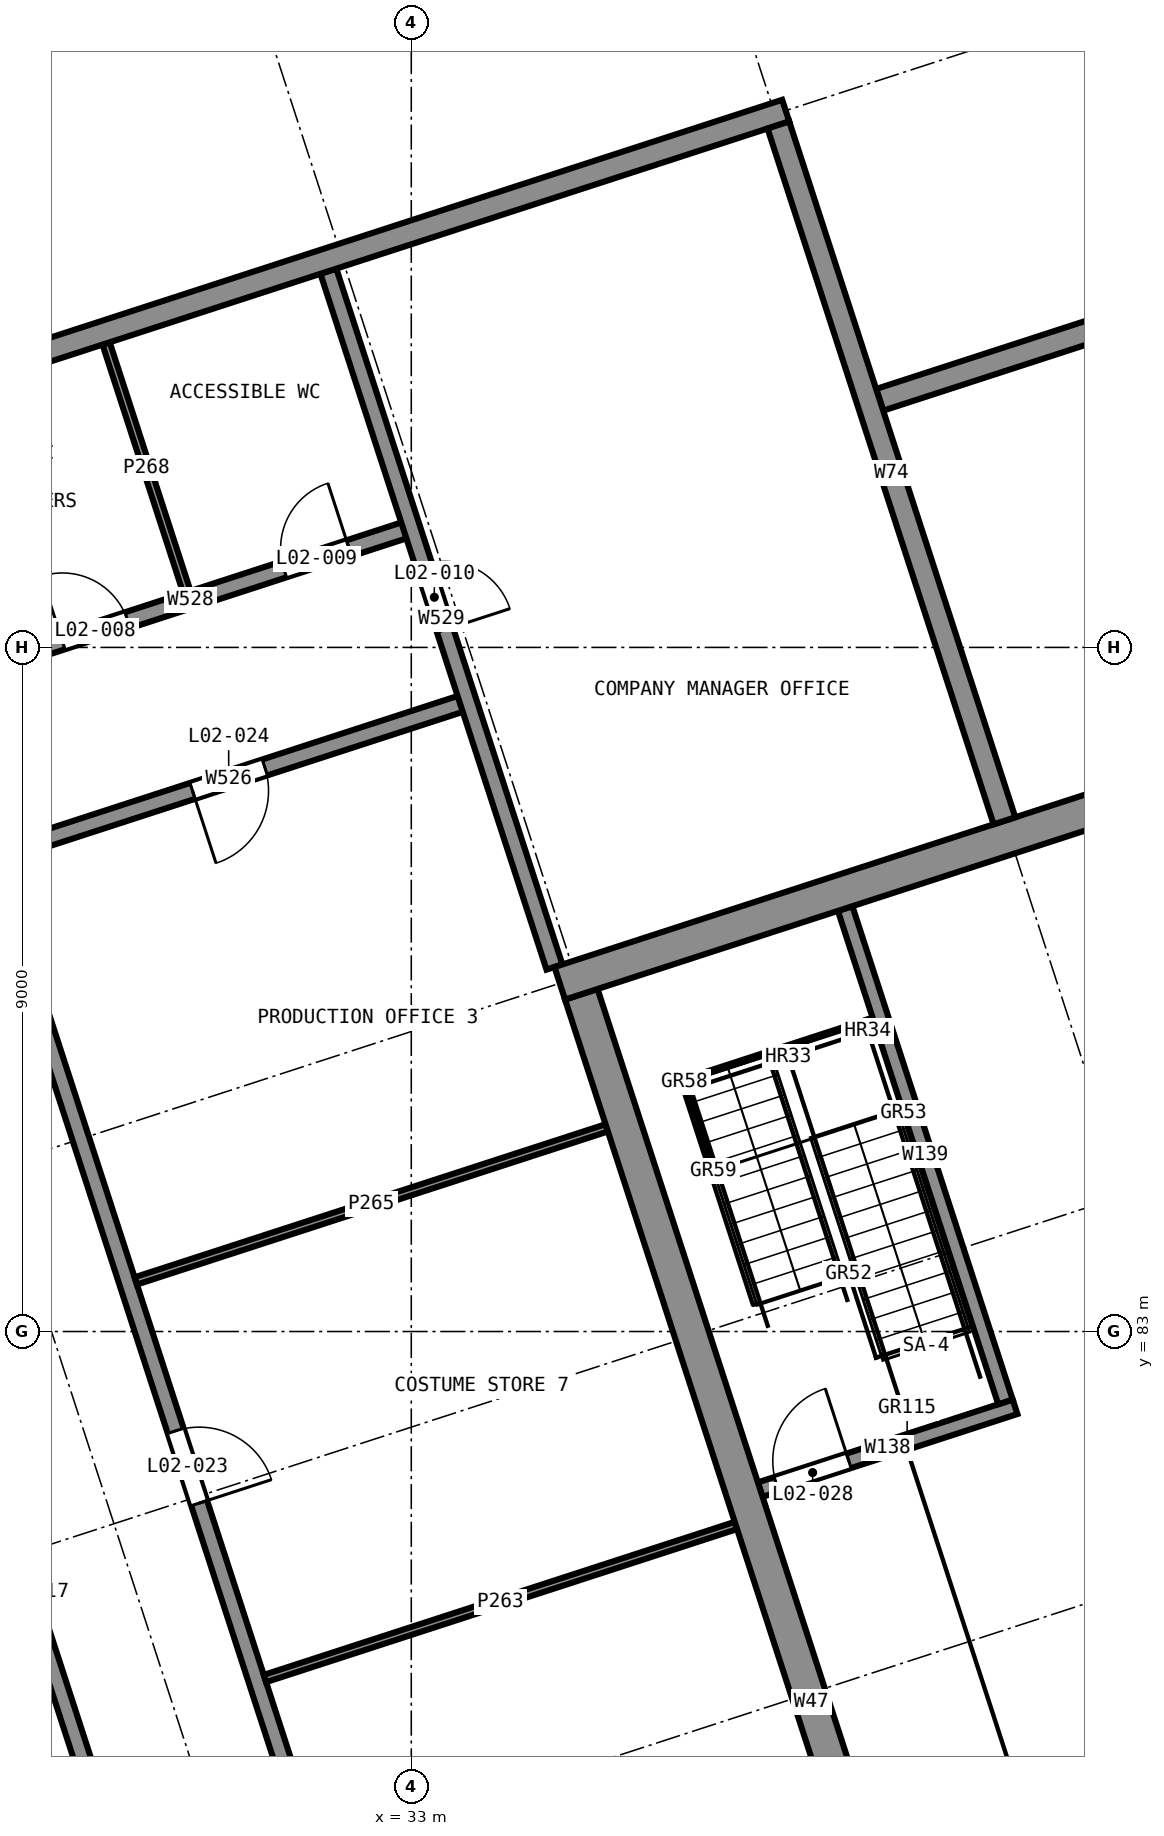
"""IFC4 building model, lengths in metres.
Left out: names, types, materials, properties, quantities, classifications, styles, units other than length and angle.
Written with IfcOpenShell. Run it as: python <this file> out.ifc"""

import sys

from ifc_helpers import new_model, si_unit, direction, frame, frame_2d, origin, place, context, subcontext, project, spatial, rectangle, extrude, element, fill, save


model = new_model("IFC4")
c1 = context("Model", 3, precision=1e-05, world=origin(), true_north=direction((0.0, 1.0)))
c2 = subcontext(c1, "Body", "Model", "MODEL_VIEW")
j1 = project(units=[si_unit("LENGTHUNIT", "METRE"), si_unit("PLANEANGLEUNIT", "RADIAN")], contexts=[c1])
p1 = place(None, origin())
s1 = spatial("IfcSite", under=j1, at=p1, CompositionType="ELEMENT")
p2 = place(p1, origin())
s2 = spatial("IfcBuilding", under=s1, at=p2, CompositionType="ELEMENT")
p3 = place(p2, frame((0.0, 0.0, 9.5)))
s3 = spatial("IfcBuildingStorey", under=s2, at=p3, CompositionType="ELEMENT", Elevation=9.5)
p4 = place(p3, frame((41.286, 68.82, 0.0), z_axis=(0.0, 0.0, 1.0), x_axis=(-0.309008517326, 0.951059270613, 0.0)))
e1 = element("IfcWall", 1, at=p4, inside=s3, PredefinedType="SHEAR", context=c2, shape_type="SweptSolid", body=[
    extrude(rectangle(XDim=19.575, YDim=0.45, at=frame_2d((9.788, 0.0))), origin(), (0.0, 0.0, 1.0), 4.0),
])
p5 = place(p3, frame((34.953, 87.581, 0.0), z_axis=(0.0, 0.0, 1.0), x_axis=(0.951059165148, 0.309008841924, 0.0)))
e2 = element("IfcWall", 2, at=p5, inside=s3, PredefinedType="SHEAR", context=c2, shape_type="SweptSolid", body=[
    extrude(rectangle(XDim=29.45, YDim=0.45, at=frame_2d((14.725, 0.0))), origin(), (0.0, 0.0, 1.0), 4.0),
])
p6 = place(p3, frame((41.562, 68.699, 2.0), z_axis=(0.0, 0.0, 1.0), x_axis=(0.951058008754, 0.309012401021, 0.0)))
e3 = element("IfcWall", 3, at=p6, inside=s3, PredefinedType="SHEAR", context=c2, shape_type="SweptSolid", body=[
    extrude(rectangle(XDim=28.55, YDim=0.4, at=frame_2d((14.275, 0.0))), origin(), (0.0, 0.0, 1.0), 2.0),
])
p7 = place(p3, frame((33.501, 41.003, 0.0), z_axis=(0.0, 0.0, 1.0), x_axis=(-0.309017194826, 0.951056451165, 0.0)))
e4 = element("IfcWall", 4, at=p7, inside=s3, PredefinedType="SOLIDWALL", context=c2, shape_type="SweptSolid", body=[
    extrude(rectangle(XDim=53.7, YDim=0.3, at=frame_2d((26.85, 0.0))), origin(), (0.0, 0.0, 1.0), 4.0),
])
p8 = place(p7, frame((21.55, 0.0, 0.9)))
e5 = element("IfcOpeningElement", 5, at=p8, cuts=e4, PredefinedType="OPENING", context=c2, shape_type="SweptSolid", body=[
    extrude(rectangle(XDim=3.6, YDim=2.1, at=frame_2d((1.8, 1.05))), frame((0.0, 0.16, 0.0), z_axis=(0.0, -1.0, 0.0), x_axis=(1.0, 0.0, 0.0)), (0.0, 0.0, 1.0), 0.32),
])
p9 = place(p3, frame((16.718, 92.171, 0.0), z_axis=(0.0, 0.0, 1.0), x_axis=(0.951055789165, 0.309019232243, 0.0)))
e6 = element("IfcWall", 6, at=p9, inside=s3, PredefinedType="SOLIDWALL", context=c2, shape_type="SweptSolid", body=[
    extrude(rectangle(XDim=22.3, YDim=0.3, at=frame_2d((11.15, 0.0))), origin(), (0.0, 0.0, 1.0), 4.0),
])
p10 = place(p3, frame((37.83, 98.873, 0.0), z_axis=(0.0, 0.0, 1.0), x_axis=(0.30902011435, -0.951055502548, 0.0)))
e7 = element("IfcWall", 7, at=p10, inside=s3, PredefinedType="SOLIDWALL", context=c2, shape_type="SweptSolid", body=[
    extrude(rectangle(XDim=9.625, YDim=0.3, at=frame_2d((4.812, 0.0))), origin(), (0.0, 0.0, 1.0), 4.0),
])
p11 = place(p3, frame((39.162, 95.258, 0.0), z_axis=(0.0, 0.0, 1.0), x_axis=(0.951058550479, 0.309010733732, 0.0)))
e8 = element("IfcWall", 8, at=p11, inside=s3, PredefinedType="SOLIDWALL", context=c2, shape_type="SweptSolid", body=[
    extrude(rectangle(XDim=17.0, YDim=0.3, at=frame_2d((8.5, 0.0))), origin(), (0.0, 0.0, 1.0), 4.0),
])
p12 = place(p3, frame((37.591, 80.92, 0.0), z_axis=(0.0, 0.0, 1.0), x_axis=(0.951052389726, 0.30902969436, 0.0)))
e9 = element("IfcWall", 9, at=p12, inside=s3, PredefinedType="SOLIDWALL", context=c2, shape_type="SweptSolid", body=[
    extrude(rectangle(XDim=3.525, YDim=0.2, at=frame_2d((1.763, 0.0))), origin(), (0.0, 0.0, 1.0), 4.0),
])
p13 = place(p12, frame((0.225, 0.0, 0.0)))
e10 = element("IfcOpeningElement", 10, at=p13, cuts=e9, PredefinedType="OPENING", context=c2, shape_type="SweptSolid", body=[
    extrude(rectangle(XDim=1.0, YDim=2.1, at=frame_2d((0.5, 1.05))), frame((0.0, 0.11, 0.0), z_axis=(0.0, -1.0, 0.0), x_axis=(1.0, 0.0, 0.0)), (0.0, 0.0, 1.0), 0.22),
])
p14 = place(p3, frame((40.817, 82.074, 0.0), z_axis=(0.0, 0.0, 1.0), x_axis=(-0.309028643499, 0.951052731186, 0.0)))
e11 = element("IfcWall", 11, at=p14, inside=s3, PredefinedType="SOLIDWALL", context=c2, shape_type="SweptSolid", body=[
    extrude(rectangle(XDim=6.825, YDim=0.2, at=frame_2d((3.413, 0.0))), origin(), (0.0, 0.0, 1.0), 4.0),
])
p15 = place(p3, frame((37.956, 48.812, 0.0), z_axis=(0.0, 0.0, 1.0), x_axis=(-0.30901736393, 0.951056396219, 0.0)))
e12 = element("IfcWall", 12, at=p15, inside=s3, PredefinedType="SOLIDWALL", context=c2, shape_type="SweptSolid", body=[
    extrude(rectangle(XDim=41.7, YDim=0.22, at=frame_2d((20.85, 0.0))), origin(), (0.0, 0.0, 1.0), 3.7),
])
p16 = place(p15, frame((2.009, 0.0, 0.0)))
e13 = element("IfcOpeningElement", 13, at=p16, cuts=e12, PredefinedType="OPENING", context=c2, shape_type="SweptSolid", body=[
    extrude(rectangle(XDim=1.0, YDim=2.1, at=frame_2d((0.5, 1.05))), frame((0.0, 0.12, 0.0), z_axis=(0.0, -1.0, 0.0), x_axis=(1.0, 0.0, 0.0)), (0.0, 0.0, 1.0), 0.24),
])
p17 = place(p15, frame((6.6, 0.0, 0.0)))
e14 = element("IfcOpeningElement", 14, at=p17, cuts=e12, PredefinedType="OPENING", context=c2, shape_type="SweptSolid", body=[
    extrude(rectangle(XDim=1.2, YDim=2.1, at=frame_2d((0.6, 1.05))), frame((0.0, 0.12, 0.0), z_axis=(0.0, -1.0, 0.0), x_axis=(1.0, 0.0, 0.0)), (0.0, 0.0, 1.0), 0.24),
])
p18 = place(p15, frame((11.7, 0.0, 0.0)))
e15 = element("IfcOpeningElement", 15, at=p18, cuts=e12, PredefinedType="OPENING", context=c2, shape_type="SweptSolid", body=[
    extrude(rectangle(XDim=1.2, YDim=2.1, at=frame_2d((0.6, 1.05))), frame((0.0, 0.12, 0.0), z_axis=(0.0, -1.0, 0.0), x_axis=(1.0, 0.0, 0.0)), (0.0, 0.0, 1.0), 0.24),
])
p19 = place(p15, frame((16.7, 0.0, 0.0)))
e16 = element("IfcOpeningElement", 16, at=p19, cuts=e12, PredefinedType="OPENING", context=c2, shape_type="SweptSolid", body=[
    extrude(rectangle(XDim=1.2, YDim=2.1, at=frame_2d((0.6, 1.05))), frame((0.0, 0.12, 0.0), z_axis=(0.0, -1.0, 0.0), x_axis=(1.0, 0.0, 0.0)), (0.0, 0.0, 1.0), 0.24),
])
p20 = place(p15, frame((21.7, 0.0, 0.0)))
e17 = element("IfcOpeningElement", 17, at=p20, cuts=e12, PredefinedType="OPENING", context=c2, shape_type="SweptSolid", body=[
    extrude(rectangle(XDim=1.2, YDim=2.1, at=frame_2d((0.6, 1.05))), frame((0.0, 0.12, 0.0), z_axis=(0.0, -1.0, 0.0), x_axis=(1.0, 0.0, 0.0)), (0.0, 0.0, 1.0), 0.24),
])
p21 = place(p15, frame((26.7, 0.0, 0.0)))
e18 = element("IfcOpeningElement", 18, at=p21, cuts=e12, PredefinedType="OPENING", context=c2, shape_type="SweptSolid", body=[
    extrude(rectangle(XDim=1.2, YDim=2.1, at=frame_2d((0.6, 1.05))), frame((0.0, 0.12, 0.0), z_axis=(0.0, -1.0, 0.0), x_axis=(1.0, 0.0, 0.0)), (0.0, 0.0, 1.0), 0.24),
])
p22 = place(p15, frame((31.739, 0.0, 0.0)))
e19 = element("IfcOpeningElement", 19, at=p22, cuts=e12, PredefinedType="OPENING", context=c2, shape_type="SweptSolid", body=[
    extrude(rectangle(XDim=1.2, YDim=2.1, at=frame_2d((0.6, 1.05))), frame((0.0, 0.12, 0.0), z_axis=(0.0, -1.0, 0.0), x_axis=(1.0, 0.0, 0.0)), (0.0, 0.0, 1.0), 0.24),
])
p23 = place(p3, frame((40.333, 49.584, 0.0), z_axis=(0.0, 0.0, 1.0), x_axis=(-0.309015643281, 0.951056955291, 0.0)))
e20 = element("IfcWall", 20, at=p23, inside=s3, PredefinedType="SOLIDWALL", context=c2, shape_type="SweptSolid", body=[
    extrude(rectangle(XDim=41.7, YDim=0.22, at=frame_2d((20.85, 0.0))), origin(), (0.0, 0.0, 1.0), 3.7),
])
p24 = place(p23, frame((1.9, 0.0, 0.0)))
e21 = element("IfcOpeningElement", 21, at=p24, cuts=e20, PredefinedType="OPENING", context=c2, shape_type="SweptSolid", body=[
    extrude(rectangle(XDim=1.2, YDim=2.1, at=frame_2d((0.6, 1.05))), frame((0.0, 0.12, 0.0), z_axis=(0.0, -1.0, 0.0), x_axis=(1.0, 0.0, 0.0)), (0.0, 0.0, 1.0), 0.24),
])
p25 = place(p23, frame((8.285, 0.0, 0.0)))
e22 = element("IfcOpeningElement", 22, at=p25, cuts=e20, PredefinedType="OPENING", context=c2, shape_type="SweptSolid", body=[
    extrude(rectangle(XDim=1.0, YDim=2.1, at=frame_2d((0.5, 1.05))), frame((0.0, 0.12, 0.0), z_axis=(0.0, -1.0, 0.0), x_axis=(1.0, 0.0, 0.0)), (0.0, 0.0, 1.0), 0.24),
])
p26 = place(p23, frame((16.475, 0.0, 0.0)))
e23 = element("IfcOpeningElement", 23, at=p26, cuts=e20, PredefinedType="OPENING", context=c2, shape_type="SweptSolid", body=[
    extrude(rectangle(XDim=1.0, YDim=2.1, at=frame_2d((0.5, 1.05))), frame((0.0, 0.12, 0.0), z_axis=(0.0, -1.0, 0.0), x_axis=(1.0, 0.0, 0.0)), (0.0, 0.0, 1.0), 0.24),
])
p27 = place(p23, frame((25.752, 0.0, 0.0)))
e24 = element("IfcOpeningElement", 24, at=p27, cuts=e20, PredefinedType="OPENING", context=c2, shape_type="SweptSolid", body=[
    extrude(rectangle(XDim=1.0, YDim=2.1, at=frame_2d((0.5, 1.05))), frame((0.0, 0.12, 0.0), z_axis=(0.0, -1.0, 0.0), x_axis=(1.0, 0.0, 0.0)), (0.0, 0.0, 1.0), 0.24),
])
p28 = place(p23, frame((32.761, 0.0, 0.0)))
e25 = element("IfcOpeningElement", 25, at=p28, cuts=e20, PredefinedType="OPENING", context=c2, shape_type="SweptSolid", body=[
    extrude(rectangle(XDim=1.0, YDim=2.1, at=frame_2d((0.5, 1.05))), frame((0.0, 0.12, 0.0), z_axis=(0.0, -1.0, 0.0), x_axis=(1.0, 0.0, 0.0)), (0.0, 0.0, 1.0), 0.24),
])
p29 = place(p3, frame((27.447, 89.243, 0.0), z_axis=(0.0, 0.0, 1.0), x_axis=(0.951062229373, 0.308999410776, 0.0)))
e26 = element("IfcWall", 26, at=p29, inside=s3, PredefinedType="SOLIDWALL", context=c2, shape_type="SweptSolid", body=[
    extrude(rectangle(XDim=6.625, YDim=0.22, at=frame_2d((3.312, 0.0))), origin(), (0.0, 0.0, 1.0), 3.7),
])
p30 = place(p29, frame((2.812, 0.0, 0.0)))
e27 = element("IfcOpeningElement", 27, at=p30, cuts=e26, PredefinedType="OPENING", context=c2, shape_type="SweptSolid", body=[
    extrude(rectangle(XDim=1.0, YDim=2.1, at=frame_2d((0.5, 1.05))), frame((0.0, 0.12, 0.0), z_axis=(0.0, -1.0, 0.0), x_axis=(1.0, 0.0, 0.0)), (0.0, 0.0, 1.0), 0.24),
])
p31 = place(p3, frame((27.181, 91.68, 0.0), z_axis=(0.0, 0.0, 1.0), x_axis=(0.951063356831, 0.308995940577, 0.0)))
e28 = element("IfcWall", 28, at=p31, inside=s3, PredefinedType="SOLIDWALL", context=c2, shape_type="SweptSolid", body=[
    extrude(rectangle(XDim=6.125, YDim=0.22, at=frame_2d((3.062, 0.0))), origin(), (0.0, 0.0, 1.0), 3.7),
])
p32 = place(p31, frame((1.293, 0.0, 0.0)))
e29 = element("IfcOpeningElement", 29, at=p32, cuts=e28, PredefinedType="OPENING", context=c2, shape_type="SweptSolid", body=[
    extrude(rectangle(XDim=0.9, YDim=2.1, at=frame_2d((0.45, 1.05))), frame((0.0, 0.12, 0.0), z_axis=(0.0, -1.0, 0.0), x_axis=(1.0, 0.0, 0.0)), (0.0, 0.0, 1.0), 0.24),
])
p33 = place(p31, frame((4.357, 0.0, 0.0)))
e30 = element("IfcOpeningElement", 30, at=p33, cuts=e28, PredefinedType="OPENING", context=c2, shape_type="SweptSolid", body=[
    extrude(rectangle(XDim=0.9, YDim=2.1, at=frame_2d((0.45, 1.05))), frame((0.0, 0.12, 0.0), z_axis=(0.0, -1.0, 0.0), x_axis=(1.0, 0.0, 0.0)), (0.0, 0.0, 1.0), 0.24),
])
p34 = place(p3, frame((34.884, 87.795, 0.0), z_axis=(0.0, 0.0, 1.0), x_axis=(-0.309027569133, 0.951053080283, 0.0)))
e31 = element("IfcWall", 31, at=p34, inside=s3, PredefinedType="SOLIDWALL", context=c2, shape_type="SweptSolid", body=[
    extrude(rectangle(XDim=9.625, YDim=0.22, at=frame_2d((4.812, 0.0))), origin(), (0.0, 0.0, 1.0), 3.7),
])
p35 = place(p34, frame((4.665, 0.0, 0.0)))
e32 = element("IfcOpeningElement", 32, at=p35, cuts=e31, PredefinedType="OPENING", context=c2, shape_type="SweptSolid", body=[
    extrude(rectangle(XDim=0.9, YDim=2.1, at=frame_2d((0.45, 1.05))), frame((0.0, 0.12, 0.0), z_axis=(0.0, -1.0, 0.0), x_axis=(1.0, 0.0, 0.0)), (0.0, 0.0, 1.0), 0.24),
])
p36 = place(p3, frame((31.075, 78.435, 0.0), z_axis=(0.0, 0.0, 1.0), x_axis=(0.951058024796, 0.309012351648, 0.0)))
e33 = element("IfcWall", 33, at=p36, inside=s3, PredefinedType="PARTITIONING", context=c2, shape_type="SweptSolid", body=[
    extrude(rectangle(XDim=6.515, YDim=0.1, at=frame_2d((3.257, 0.0))), origin(), (0.0, 0.0, 1.0), 3.7),
])
p37 = place(p3, frame((29.375, 83.666, 0.0), z_axis=(0.0, 0.0, 1.0), x_axis=(0.951061602966, 0.309001338773, 0.0)))
e34 = element("IfcWall", 34, at=p37, inside=s3, PredefinedType="PARTITIONING", context=c2, shape_type="SweptSolid", body=[
    extrude(rectangle(XDim=6.515, YDim=0.1, at=frame_2d((3.258, 0.0))), origin(), (0.0, 0.0, 1.0), 3.7),
])
p38 = place(p3, frame((30.048, 92.727, 0.0), z_axis=(0.0, 0.0, 1.0), x_axis=(-0.309021877853, 0.951054929543, 0.0)))
e35 = element("IfcWall", 35, at=p38, inside=s3, PredefinedType="PARTITIONING", context=c2, shape_type="SweptSolid", body=[
    extrude(rectangle(XDim=3.44, YDim=0.1, at=frame_2d((1.72, 0.0))), origin(), (0.0, 0.0, 1.0), 3.7),
])
p39 = place(p32, origin())
e36 = element("IfcDoor", 36, at=p39, inside=s3, OperationType="SINGLE_SWING_RIGHT", PredefinedType="DOOR", context=c2, shape_type="SweptSolid", body=[
    extrude(rectangle(XDim=0.9, YDim=2.1, at=frame_2d((0.45, 1.05))), frame((0.0, 0.025, 0.0), z_axis=(0.0, -1.0, 0.0), x_axis=(1.0, 0.0, 0.0)), (0.0, 0.0, 1.0), 0.05),
])
fill(e29, e36)
p40 = place(p33, origin())
e37 = element("IfcDoor", 37, at=p40, inside=s3, OperationType="SINGLE_SWING_LEFT", PredefinedType="DOOR", context=c2, shape_type="SweptSolid", body=[
    extrude(rectangle(XDim=0.9, YDim=2.1, at=frame_2d((0.45, 1.05))), frame((0.0, 0.025, 0.0), z_axis=(0.0, -1.0, 0.0), x_axis=(1.0, 0.0, 0.0)), (0.0, 0.0, 1.0), 0.05),
])
fill(e30, e37)
p41 = place(p35, frame((0.9, 0.0, 0.0), z_axis=(0.0, 0.0, 1.0), x_axis=(-1.0, 0.0, 0.0)))
e38 = element("IfcDoor", 38, at=p41, inside=s3, OperationType="SINGLE_SWING_LEFT", PredefinedType="DOOR", context=c2, shape_type="SweptSolid", body=[
    extrude(rectangle(XDim=0.9, YDim=2.1, at=frame_2d((0.45, 1.05))), frame((0.0, 0.025, 0.0), z_axis=(0.0, -1.0, 0.0), x_axis=(1.0, 0.0, 0.0)), (0.0, 0.0, 1.0), 0.05),
])
fill(e32, e38)
p42 = place(p28, frame((1.0, 0.0, 0.0), z_axis=(0.0, 0.0, 1.0), x_axis=(-1.0, 0.0, 0.0)))
e39 = element("IfcDoor", 39, at=p42, inside=s3, OperationType="SINGLE_SWING_LEFT", PredefinedType="DOOR", context=c2, shape_type="SweptSolid", body=[
    extrude(rectangle(XDim=1.0, YDim=2.1, at=frame_2d((0.5, 1.05))), frame((0.0, 0.025, 0.0), z_axis=(0.0, -1.0, 0.0), x_axis=(1.0, 0.0, 0.0)), (0.0, 0.0, 1.0), 0.05),
])
fill(e25, e39)
p43 = place(p30, frame((1.0, 0.0, 0.0), z_axis=(0.0, 0.0, 1.0), x_axis=(-1.0, 0.0, 0.0)))
e40 = element("IfcDoor", 40, at=p43, inside=s3, OperationType="SINGLE_SWING_LEFT", PredefinedType="DOOR", context=c2, shape_type="SweptSolid", body=[
    extrude(rectangle(XDim=1.0, YDim=2.1, at=frame_2d((0.5, 1.05))), frame((0.0, 0.025, 0.0), z_axis=(0.0, -1.0, 0.0), x_axis=(1.0, 0.0, 0.0)), (0.0, 0.0, 1.0), 0.05),
])
fill(e27, e40)
p44 = place(p13, origin())
e41 = element("IfcDoor", 41, at=p44, inside=s3, OperationType="SINGLE_SWING_LEFT", PredefinedType="DOOR", context=c2, shape_type="SweptSolid", body=[
    extrude(rectangle(XDim=1.0, YDim=2.1, at=frame_2d((0.5, 1.05))), frame((0.0, 0.025, 0.0), z_axis=(0.0, -1.0, 0.0), x_axis=(1.0, 0.0, 0.0)), (0.0, 0.0, 1.0), 0.05),
])
fill(e10, e41)
save(model, sys.argv[1])
